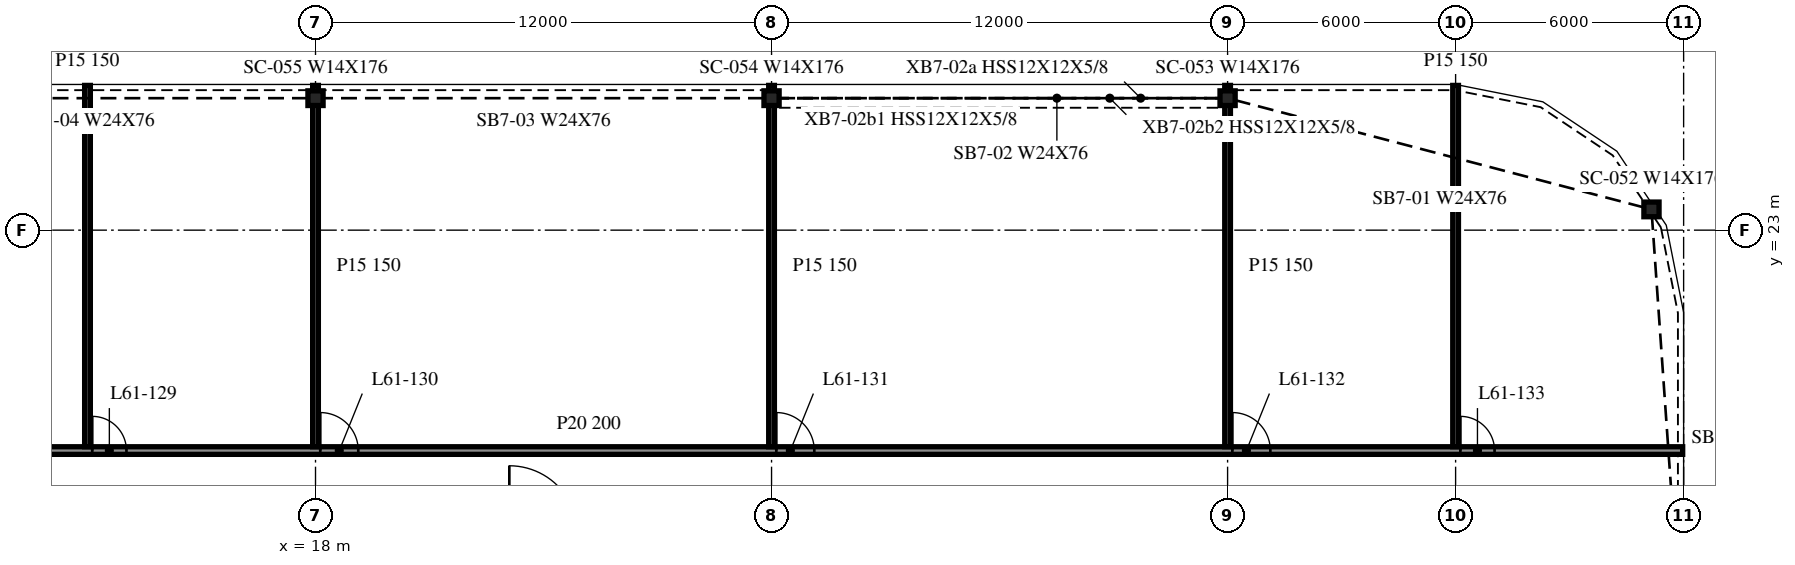
"""IFC4 building model, lengths in metres.
Left out: names, types, materials, properties, quantities, classifications, styles, units other than length and angle.
Written with IfcOpenShell. Run it as: python <this file> out.ifc"""

import sys

from ifc_helpers import new_model, si_unit, direction, frame, frame_2d, origin, origin_2d, place, context, subcontext, project, spatial, rectangle, i_section, extrude, element, fill, save


model = new_model("IFC4")
c1 = context("Model", 3, precision=1e-05, world=origin(), true_north=direction((0.0, 1.0)))
c2 = subcontext(c1, "Body", "Model", "MODEL_VIEW")
j1 = project(units=[si_unit("LENGTHUNIT", "METRE"), si_unit("PLANEANGLEUNIT", "RADIAN")], contexts=[c1])
p1 = place(None, origin())
s1 = spatial("IfcSite", under=j1, at=p1, CompositionType="ELEMENT")
p2 = place(p1, origin())
s2 = spatial("IfcBuilding", under=s1, at=p2, CompositionType="ELEMENT")
p3 = place(p2, frame((0.0, 0.0, 251.4)))
s3 = spatial("IfcBuildingStorey", under=s2, at=p3, CompositionType="ELEMENT", Elevation=251.4)
for number, where, z_axis, x_axis in (
    (1, (53.154, 23.546, -0.34), (0.0, 0.0, 1.0), (1.0, 0.0, 0.0)),
    (2, (42.0, 26.473, -0.34), (0.0, 0.0, 1.0), (1.0, 0.0, 0.0)),
    (3, (30.0, 26.473, -0.34), (0.0, 0.0, 1.0), (1.0, 0.0, 0.0)),
    (4, (18.0, 26.473, -0.34), (0.0, 0.0, 1.0), (1.0, 0.0, 0.0)),
):
    element("IfcColumn", number, at=place(p3, frame(where, z_axis=z_axis, x_axis=x_axis)), inside=s3, PredefinedType="COLUMN", context=c2, shape_type="SweptSolid", body=[
        extrude(i_section(OverallWidth=0.399, OverallDepth=0.386, WebThickness=0.021, FlangeThickness=0.033, at=origin_2d()), origin(), (0.0, 0.0, 1.0), 3.8),
    ])
p4 = place(p3, frame((-41.975, 17.2, 0.0), z_axis=(0.0, 0.0, 1.0), x_axis=(1.0, 0.0, 0.0)))
e5 = element("IfcWall", 5, at=p4, inside=s3, PredefinedType="PARTITIONING", context=c2, shape_type="SweptSolid", body=[
    extrude(rectangle(XDim=95.95, YDim=0.2, at=frame_2d((47.975, 0.0))), origin(), (0.0, 0.0, 1.0), 3.46),
])
p5 = place(p4, frame((10.5, 0.0, 0.0)))
e6 = element("IfcOpeningElement", 6, at=p5, cuts=e5, PredefinedType="OPENING", context=c2, shape_type="SweptSolid", body=[
    extrude(rectangle(XDim=1.0, YDim=2.1, at=frame_2d((0.5, 1.05))), frame((0.0, 0.11, 0.0), z_axis=(0.0, -1.0, 0.0), x_axis=(1.0, 0.0, 0.0)), (0.0, 0.0, 1.0), 0.22),
])
p6 = place(p4, frame((22.5, 0.0, 0.0)))
e7 = element("IfcOpeningElement", 7, at=p6, cuts=e5, PredefinedType="OPENING", context=c2, shape_type="SweptSolid", body=[
    extrude(rectangle(XDim=1.0, YDim=2.1, at=frame_2d((0.5, 1.05))), frame((0.0, 0.11, 0.0), z_axis=(0.0, -1.0, 0.0), x_axis=(1.0, 0.0, 0.0)), (0.0, 0.0, 1.0), 0.22),
])
p7 = place(p4, frame((28.5, 0.0, 0.0)))
e8 = element("IfcOpeningElement", 8, at=p7, cuts=e5, PredefinedType="OPENING", context=c2, shape_type="SweptSolid", body=[
    extrude(rectangle(XDim=1.0, YDim=2.1, at=frame_2d((0.5, 1.05))), frame((0.0, 0.11, 0.0), z_axis=(0.0, -1.0, 0.0), x_axis=(1.0, 0.0, 0.0)), (0.0, 0.0, 1.0), 0.22),
])
p8 = place(p4, frame((40.7, 0.0, 0.0)))
e9 = element("IfcOpeningElement", 9, at=p8, cuts=e5, PredefinedType="OPENING", context=c2, shape_type="SweptSolid", body=[
    extrude(rectangle(XDim=0.9, YDim=2.1, at=frame_2d((0.45, 1.05))), frame((0.0, 0.11, 0.0), z_axis=(0.0, -1.0, 0.0), x_axis=(1.0, 0.0, 0.0)), (0.0, 0.0, 1.0), 0.22),
])
p9 = place(p4, frame((47.3, 0.0, 0.0)))
e10 = element("IfcOpeningElement", 10, at=p9, cuts=e5, PredefinedType="OPENING", context=c2, shape_type="SweptSolid", body=[
    extrude(rectangle(XDim=1.0, YDim=2.1, at=frame_2d((0.5, 1.05))), frame((0.0, 0.11, 0.0), z_axis=(0.0, -1.0, 0.0), x_axis=(1.0, 0.0, 0.0)), (0.0, 0.0, 1.0), 0.22),
])
p10 = place(p4, frame((54.1, 0.0, 0.0)))
e11 = element("IfcOpeningElement", 11, at=p10, cuts=e5, PredefinedType="OPENING", context=c2, shape_type="SweptSolid", body=[
    extrude(rectangle(XDim=0.9, YDim=2.1, at=frame_2d((0.45, 1.05))), frame((0.0, 0.11, 0.0), z_axis=(0.0, -1.0, 0.0), x_axis=(1.0, 0.0, 0.0)), (0.0, 0.0, 1.0), 0.22),
])
p11 = place(p4, frame((60.1, 0.0, 0.0)))
e12 = element("IfcOpeningElement", 12, at=p11, cuts=e5, PredefinedType="OPENING", context=c2, shape_type="SweptSolid", body=[
    extrude(rectangle(XDim=1.0, YDim=2.1, at=frame_2d((0.5, 1.05))), frame((0.0, 0.11, 0.0), z_axis=(0.0, -1.0, 0.0), x_axis=(1.0, 0.0, 0.0)), (0.0, 0.0, 1.0), 0.22),
])
p12 = place(p4, frame((72.1, 0.0, 0.0)))
e13 = element("IfcOpeningElement", 13, at=p12, cuts=e5, PredefinedType="OPENING", context=c2, shape_type="SweptSolid", body=[
    extrude(rectangle(XDim=1.0, YDim=2.1, at=frame_2d((0.5, 1.05))), frame((0.0, 0.11, 0.0), z_axis=(0.0, -1.0, 0.0), x_axis=(1.0, 0.0, 0.0)), (0.0, 0.0, 1.0), 0.22),
])
p13 = place(p4, frame((84.1, 0.0, 0.0)))
e14 = element("IfcOpeningElement", 14, at=p13, cuts=e5, PredefinedType="OPENING", context=c2, shape_type="SweptSolid", body=[
    extrude(rectangle(XDim=1.0, YDim=2.1, at=frame_2d((0.5, 1.05))), frame((0.0, 0.11, 0.0), z_axis=(0.0, -1.0, 0.0), x_axis=(1.0, 0.0, 0.0)), (0.0, 0.0, 1.0), 0.22),
])
p14 = place(p4, frame((90.1, 0.0, 0.0)))
e15 = element("IfcOpeningElement", 15, at=p14, cuts=e5, PredefinedType="OPENING", context=c2, shape_type="SweptSolid", body=[
    extrude(rectangle(XDim=0.9, YDim=2.1, at=frame_2d((0.45, 1.05))), frame((0.0, 0.11, 0.0), z_axis=(0.0, -1.0, 0.0), x_axis=(1.0, 0.0, 0.0)), (0.0, 0.0, 1.0), 0.22),
])
for number, where, z_axis, x_axis in (
    (16, (12.0, 17.3, 0.0), (0.0, 0.0, 1.0), (0.0, 1.0, 0.0)),
    (17, (18.0, 17.3, 0.0), (0.0, 0.0, 1.0), (0.0, 1.0, 0.0)),
    (18, (30.0, 17.3, 0.0), (0.0, 0.0, 1.0), (0.0, 1.0, 0.0)),
    (19, (42.0, 17.3, 0.0), (0.0, 0.0, 1.0), (0.0, 1.0, 0.0)),
    (20, (48.0, 17.3, 0.0), (0.0, 0.0, 1.0), (0.0, 1.0, 0.0)),
):
    element("IfcWall", number, at=place(p3, frame(where, z_axis=z_axis, x_axis=x_axis)), inside=s3, PredefinedType="PARTITIONING", context=c2, shape_type="SweptSolid", body=[
        extrude(rectangle(XDim=9.509, YDim=0.15, at=frame_2d((4.754, 0.0))), origin(), (0.0, 0.0, 1.0), 3.46),
    ])
p15 = place(p10, origin())
e21 = element("IfcDoor", 21, at=p15, inside=s3, OperationType="SINGLE_SWING_RIGHT", PredefinedType="DOOR", context=c2, shape_type="SweptSolid", body=[
    extrude(rectangle(XDim=0.9, YDim=2.1, at=frame_2d((0.45, 1.05))), frame((0.0, 0.025, 0.0), z_axis=(0.0, -1.0, 0.0), x_axis=(1.0, 0.0, 0.0)), (0.0, 0.0, 1.0), 0.05),
])
fill(e11, e21)
p16 = place(p11, origin())
e22 = element("IfcDoor", 22, at=p16, inside=s3, OperationType="SINGLE_SWING_RIGHT", PredefinedType="DOOR", context=c2, shape_type="SweptSolid", body=[
    extrude(rectangle(XDim=1.0, YDim=2.1, at=frame_2d((0.5, 1.05))), frame((0.0, 0.025, 0.0), z_axis=(0.0, -1.0, 0.0), x_axis=(1.0, 0.0, 0.0)), (0.0, 0.0, 1.0), 0.05),
])
fill(e12, e22)
p17 = place(p12, origin())
e23 = element("IfcDoor", 23, at=p17, inside=s3, OperationType="SINGLE_SWING_RIGHT", PredefinedType="DOOR", context=c2, shape_type="SweptSolid", body=[
    extrude(rectangle(XDim=1.0, YDim=2.1, at=frame_2d((0.5, 1.05))), frame((0.0, 0.025, 0.0), z_axis=(0.0, -1.0, 0.0), x_axis=(1.0, 0.0, 0.0)), (0.0, 0.0, 1.0), 0.05),
])
fill(e13, e23)
p18 = place(p13, origin())
e24 = element("IfcDoor", 24, at=p18, inside=s3, OperationType="SINGLE_SWING_RIGHT", PredefinedType="DOOR", context=c2, shape_type="SweptSolid", body=[
    extrude(rectangle(XDim=1.0, YDim=2.1, at=frame_2d((0.5, 1.05))), frame((0.0, 0.025, 0.0), z_axis=(0.0, -1.0, 0.0), x_axis=(1.0, 0.0, 0.0)), (0.0, 0.0, 1.0), 0.05),
])
fill(e14, e24)
p19 = place(p14, origin())
e25 = element("IfcDoor", 25, at=p19, inside=s3, OperationType="SINGLE_SWING_RIGHT", PredefinedType="DOOR", context=c2, shape_type="SweptSolid", body=[
    extrude(rectangle(XDim=0.9, YDim=2.1, at=frame_2d((0.45, 1.05))), frame((0.0, 0.025, 0.0), z_axis=(0.0, -1.0, 0.0), x_axis=(1.0, 0.0, 0.0)), (0.0, 0.0, 1.0), 0.05),
])
fill(e15, e25)
save(model, sys.argv[1])
